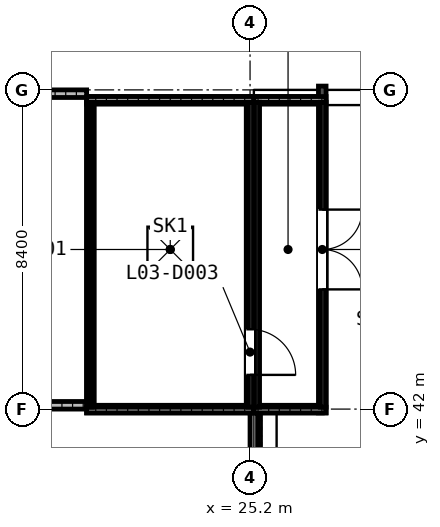
"""IFC4 building model, lengths in metres.
Left out: names, types, materials, properties, quantities, classifications, styles, units other than length and angle.
Written with IfcOpenShell. Run it as: python <this file> out.ifc"""

import sys

from ifc_helpers import new_model, si_unit, direction, frame, frame_2d, origin, origin_2d, place, context, subcontext, project, spatial, rectangle, extrude, element, fill, save


model = new_model("IFC4")
c1 = context("Model", 3, precision=1e-05, world=origin(), true_north=direction((0.0, 1.0)))
c2 = subcontext(c1, "Body", "Model", "MODEL_VIEW")
j1 = project(units=[si_unit("LENGTHUNIT", "METRE"), si_unit("PLANEANGLEUNIT", "RADIAN")], contexts=[c1])
p1 = place(None, origin())
s1 = spatial("IfcSite", under=j1, at=p1, CompositionType="ELEMENT")
p2 = place(p1, origin())
s2 = spatial("IfcBuilding", under=s1, at=p2, CompositionType="ELEMENT")
p3 = place(p2, frame((0.0, 0.0, 14.4)))
s3 = spatial("IfcBuildingStorey", under=s2, at=p3, CompositionType="ELEMENT", Elevation=14.4)
for number, where, z_axis, x_axis in (
    (1, (20.9, 42.0, -0.3), (0.0, 0.0, 1.0), (1.0, 0.0, 0.0)),
    (2, (20.9, 50.125, -0.3), (0.0, 0.0, 1.0), (1.0, 0.0, 0.0)),
):
    element("IfcWall", number, at=place(p3, frame(where, z_axis=z_axis, x_axis=x_axis)), inside=s3, PredefinedType="SHEAR", context=c2, shape_type="SweptSolid", body=[
        extrude(rectangle(XDim=4.4, YDim=0.2, at=frame_2d((2.2, 0.0))), origin(), (0.0, 0.0, 1.0), 3.0),
    ])
p4 = place(p3, frame((21.0, 42.1, -0.3), z_axis=(0.0, 0.0, 1.0), x_axis=(0.0, 1.0, 0.0)))
e3 = element("IfcWall", 3, at=p4, inside=s3, PredefinedType="SHEAR", context=c2, shape_type="SweptSolid", body=[
    extrude(rectangle(XDim=7.925, YDim=0.2, at=frame_2d((3.962, 0.0))), origin(), (0.0, 0.0, 1.0), 3.0),
])
p5 = place(p3, frame((25.2, 42.1, -0.3), z_axis=(0.0, 0.0, 1.0), x_axis=(0.0, 1.0, 0.0)))
e4 = element("IfcWall", 4, at=p5, inside=s3, PredefinedType="SHEAR", context=c2, shape_type="SweptSolid", body=[
    extrude(rectangle(XDim=7.925, YDim=0.2, at=frame_2d((3.962, 0.0))), origin(), (0.0, 0.0, 1.0), 3.0),
])
p6 = place(p5, frame((0.8, 0.0, 0.3)))
e5 = element("IfcOpeningElement", 5, at=p6, cuts=e4, PredefinedType="OPENING", context=c2, shape_type="SweptSolid", body=[
    extrude(rectangle(XDim=1.2, YDim=2.2, at=frame_2d((0.6, 1.1))), frame((0.0, 0.11, 0.0), z_axis=(0.0, -1.0, 0.0), x_axis=(1.0, 0.0, 0.0)), (0.0, 0.0, 1.0), 0.22),
])
for number, where, z_axis, x_axis in (
    (6, (25.2, 42.0, -0.3), (0.0, 0.0, 1.0), (1.0, 0.0, 0.0)),
    (7, (25.2, 50.125, -0.3), (0.0, 0.0, 1.0), (1.0, 0.0, 0.0)),
):
    element("IfcWall", number, at=place(p3, frame(where, z_axis=z_axis, x_axis=x_axis)), inside=s3, PredefinedType="SHEAR", context=c2, shape_type="SweptSolid", body=[
        extrude(rectangle(XDim=1.9, YDim=0.2, at=frame_2d((0.95, 0.0))), origin(), (0.0, 0.0, 1.0), 3.0),
    ])
p7 = place(p3, frame((27.1, 41.9, -0.3), z_axis=(0.0, 0.0, 1.0), x_axis=(0.0, 1.0, 0.0)))
e8 = element("IfcWall", 8, at=p7, inside=s3, PredefinedType="SHEAR", context=c2, shape_type="SweptSolid", body=[
    extrude(rectangle(XDim=8.6, YDim=0.2, at=frame_2d((4.3, 0.0))), origin(), (0.0, 0.0, 1.0), 3.0),
])
p8 = place(p7, frame((5.35, 0.0, 0.3), z_axis=(0.0, 0.0, 1.0), x_axis=(-1.0, 0.0, 0.0)))
e9 = element("IfcOpeningElement", 9, at=p8, cuts=e8, PredefinedType="OPENING", context=c2, shape_type="SweptSolid", body=[
    extrude(rectangle(XDim=2.1, YDim=2.2, at=frame_2d((1.05, 1.1))), frame((0.0, 0.11, 0.0), z_axis=(0.0, -1.0, 0.0), x_axis=(1.0, 0.0, 0.0)), (0.0, 0.0, 1.0), 0.22),
])
p9 = place(p3, frame((20.9, 42.1, 0.0), z_axis=(0.0, 0.0, 1.0), x_axis=(-1.0, 0.0, 0.0)))
e10 = element("IfcWall", 10, at=p9, inside=s3, PredefinedType="PARAPET", context=c2, shape_type="SweptSolid", body=[
    extrude(rectangle(XDim=20.9, YDim=0.2, at=frame_2d((10.45, 0.0))), origin(), (0.0, 0.0, 1.0), 1.5),
])
p10 = place(p3, frame((0.2, 50.3, 0.0), z_axis=(0.0, 0.0, 1.0), x_axis=(1.0, 0.0, 0.0)))
e11 = element("IfcWall", 11, at=p10, inside=s3, PredefinedType="PARAPET", context=c2, shape_type="SweptSolid", body=[
    extrude(rectangle(XDim=20.7, YDim=0.2, at=frame_2d((10.35, 0.0))), origin(), (0.0, 0.0, 1.0), 1.5),
])
p11 = place(p3, frame((25.3, 33.7, 0.0), z_axis=(0.0, 0.0, 1.0), x_axis=(0.0, 1.0, 0.0)))
e12 = element("IfcWall", 12, at=p11, inside=s3, PredefinedType="PARAPET", context=c2, shape_type="SweptSolid", body=[
    extrude(rectangle(XDim=8.2, YDim=0.2, at=frame_2d((4.1, 0.0))), origin(), (0.0, 0.0, 1.0), 1.5),
])
for number, where, z_axis, x_axis in (
    (13, (20.9, 41.975, 2.9), (0.0, 0.0, 1.0), (1.0, 0.0, 0.0)),
    (14, (20.9, 50.15, 2.9), (0.0, 0.0, 1.0), (1.0, 0.0, 0.0)),
):
    element("IfcWall", number, at=place(p3, frame(where, z_axis=z_axis, x_axis=x_axis)), inside=s3, PredefinedType="PARAPET", context=c2, shape_type="SweptSolid", body=[
        extrude(rectangle(XDim=4.4, YDim=0.15, at=frame_2d((2.2, 0.0))), origin(), (0.0, 0.0, 1.0), 0.45),
    ])
for number, where, z_axis, x_axis in (
    (15, (20.975, 42.05, 2.9), (0.0, 0.0, 1.0), (0.0, 1.0, 0.0)),
    (16, (25.225, 42.05, 2.9), (0.0, 0.0, 1.0), (0.0, 1.0, 0.0)),
):
    element("IfcWall", number, at=place(p3, frame(where, z_axis=z_axis, x_axis=x_axis)), inside=s3, PredefinedType="PARAPET", context=c2, shape_type="SweptSolid", body=[
        extrude(rectangle(XDim=8.025, YDim=0.15, at=frame_2d((4.012, 0.0))), origin(), (0.0, 0.0, 1.0), 0.45),
    ])
for number, where, z_axis, x_axis in (
    (17, (25.3, 41.975, 2.9), (0.0, 0.0, 1.0), (1.0, 0.0, 0.0)),
    (18, (25.3, 50.15, 2.9), (0.0, 0.0, 1.0), (1.0, 0.0, 0.0)),
):
    element("IfcWall", number, at=place(p3, frame(where, z_axis=z_axis, x_axis=x_axis)), inside=s3, PredefinedType="PARAPET", context=c2, shape_type="SweptSolid", body=[
        extrude(rectangle(XDim=1.9, YDim=0.15, at=frame_2d((0.95, 0.0))), origin(), (0.0, 0.0, 1.0), 0.45),
    ])
for number, where, z_axis, x_axis in (
    (19, (25.375, 42.05, 2.9), (0.0, 0.0, 1.0), (0.0, 1.0, 0.0)),
    (20, (27.125, 42.05, 2.9), (0.0, 0.0, 1.0), (0.0, 1.0, 0.0)),
):
    element("IfcWall", number, at=place(p3, frame(where, z_axis=z_axis, x_axis=x_axis)), inside=s3, PredefinedType="PARAPET", context=c2, shape_type="SweptSolid", body=[
        extrude(rectangle(XDim=8.025, YDim=0.15, at=frame_2d((4.012, 0.0))), origin(), (0.0, 0.0, 1.0), 0.45),
    ])
p12 = place(p8, origin())
e21 = element("IfcDoor", 21, at=p12, inside=s3, OperationType="DOUBLE_DOOR_SINGLE_SWING", PredefinedType="DOOR", context=c2, shape_type="SweptSolid", body=[
    extrude(rectangle(XDim=2.1, YDim=0.013, at=frame_2d((1.05, 0.007))), frame((0.0, 0.088, 0.0), z_axis=(0.0, -1.0, 0.0), x_axis=(1.0, 0.0, 0.0)), (0.0, 0.0, 1.0), 0.176),
    extrude(rectangle(XDim=0.075, YDim=2.112, at=frame_2d((0.038, 1.069))), frame((0.0, 0.098, 0.0), z_axis=(0.0, -1.0, 0.0), x_axis=(1.0, 0.0, 0.0)), (0.0, 0.0, 1.0), 0.196),
    extrude(rectangle(XDim=0.075, YDim=2.112, at=frame_2d((2.062, 1.069))), frame((0.0, 0.098, 0.0), z_axis=(0.0, -1.0, 0.0), x_axis=(1.0, 0.0, 0.0)), (0.0, 0.0, 1.0), 0.196),
    extrude(rectangle(XDim=2.1, YDim=0.075, at=frame_2d((1.05, 2.163))), frame((0.0, 0.088, 0.0), z_axis=(0.0, -1.0, 0.0), x_axis=(1.0, 0.0, 0.0)), (0.0, 0.0, 1.0), 0.176),
    extrude(rectangle(XDim=1.95, YDim=2.112, at=frame_2d((1.05, 1.069))), frame((0.0, 0.025, 0.0), z_axis=(0.0, -1.0, 0.0), x_axis=(1.0, 0.0, 0.0)), (0.0, 0.0, 1.0), 0.05),
])
fill(e9, e21)
p13 = place(p6, origin())
e22 = element("IfcDoor", 22, at=p13, inside=s3, OperationType="SINGLE_SWING_LEFT", PredefinedType="DOOR", context=c2, shape_type="SweptSolid", body=[
    extrude(rectangle(XDim=1.2, YDim=2.2, at=frame_2d((0.6, 1.1))), frame((0.0, 0.025, 0.0), z_axis=(0.0, -1.0, 0.0), x_axis=(1.0, 0.0, 0.0)), (0.0, 0.0, 1.0), 0.05),
])
fill(e5, e22)
p14 = place(p3, frame((0.0, 0.0, 2.7)))
p15 = place(p14, frame((23.1, 46.2, 0.0)))
p16 = place(p15, frame((0.0, 0.0, 0.15)))
e23 = element("IfcWindow", 23, at=p16, inside=s3, PartitioningType="SINGLE_PANEL", PredefinedType="SKYLIGHT", context=c2, shape_type="SweptSolid", body=[
    extrude(rectangle(XDim=1.2, YDim=1.2, at=origin_2d()), origin(), (0.0, 0.0, 1.0), 0.05),
])
save(model, sys.argv[1])
